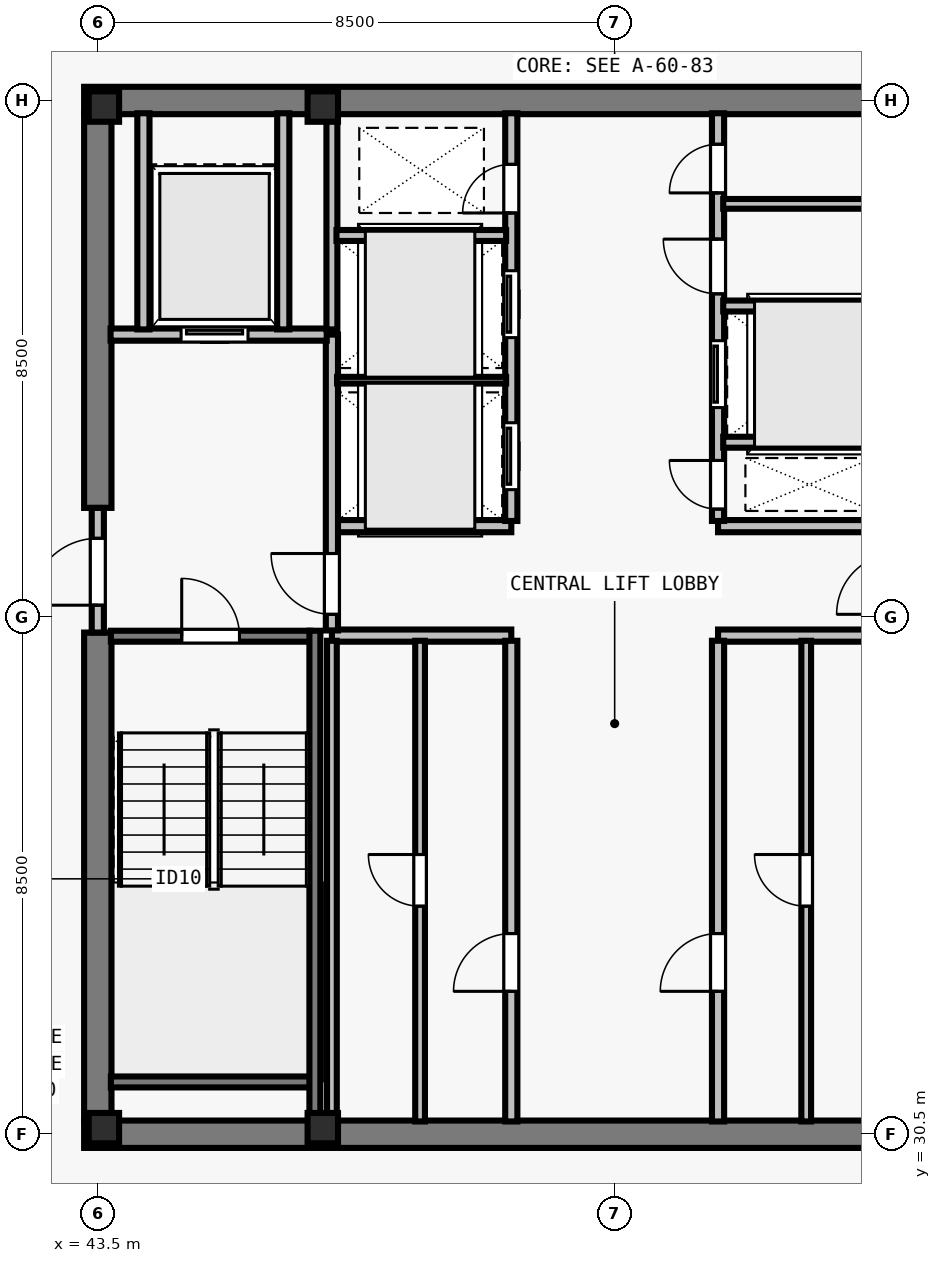
"""IFC4 building model, lengths in metres.
Left out: names, types, materials, properties, quantities, classifications, styles, units other than length and angle.
Written with IfcOpenShell. Run it as: python <this file> out.ifc"""

import sys

from ifc_helpers import new_model, si_unit, direction, frame, frame_2d, origin, origin_2d, place, context, subcontext, project, spatial, rectangle, i_section, extrude, element, fill, save


model = new_model("IFC4")
c1 = context("Model", 3, precision=1e-05, world=origin(), true_north=direction((0.0, 1.0)))
c2 = subcontext(c1, "Body", "Model", "MODEL_VIEW")
j1 = project(units=[si_unit("LENGTHUNIT", "METRE"), si_unit("PLANEANGLEUNIT", "RADIAN")], contexts=[c1])
p1 = place(None, origin())
s1 = spatial("IfcSite", under=j1, at=p1, CompositionType="ELEMENT")
p2 = place(p1, origin())
s2 = spatial("IfcBuilding", under=s1, at=p2, CompositionType="ELEMENT")
p3 = place(p2, frame((0.0, 0.0, 291.0)))
s3 = spatial("IfcBuildingStorey", under=s2, at=p3, CompositionType="ELEMENT", Elevation=291.0)
for number, where, z_axis, x_axis in (
    (1, (43.6, 30.6, 0.0), (0.0, 0.0, 1.0), (1.0, 0.0, 0.0)),
    (2, (47.2, 30.6, 0.0), (0.0, 0.0, 1.0), (1.0, 0.0, 0.0)),
    (3, (43.6, 47.4, 0.0), (0.0, 0.0, 1.0), (1.0, 0.0, 0.0)),
    (4, (47.2, 47.4, 0.0), (0.0, 0.0, 1.0), (1.0, 0.0, 0.0)),
):
    element("IfcColumn", number, at=place(p3, frame(where, z_axis=z_axis, x_axis=x_axis)), inside=s3, PredefinedType="COLUMN", context=c2, shape_type="SweptSolid", body=[
        extrude(i_section(OverallWidth=0.5, OverallDepth=0.5, WebThickness=0.028, FlangeThickness=0.045, at=origin_2d()), origin(), (0.0, 0.0, 1.0), 3.5),
    ])
for number, where, z_axis, x_axis in (
    (5, (43.275, 30.5, 0.0), (0.0, 0.0, 1.0), (1.0, 0.0, 0.0)),
    (6, (43.275, 47.5, 0.0), (0.0, 0.0, 1.0), (1.0, 0.0, 0.0)),
):
    element("IfcWall", number, at=place(p3, frame(where, z_axis=z_axis, x_axis=x_axis)), inside=s3, PredefinedType="SHEAR", context=c2, shape_type="SweptSolid", body=[
        extrude(rectangle(XDim=17.45, YDim=0.45, at=frame_2d((8.725, 0.0))), origin(), (0.0, 0.0, 1.0), 3.29),
    ])
p4 = place(p3, frame((43.5, 30.715, 0.0), z_axis=(0.0, 0.0, 1.0), x_axis=(0.0, 1.0, 0.0)))
e7 = element("IfcWall", 7, at=p4, inside=s3, PredefinedType="SHEAR", context=c2, shape_type="SweptSolid", body=[
    extrude(rectangle(XDim=8.035, YDim=0.45, at=frame_2d((4.018, 0.0))), origin(), (0.0, 0.0, 1.0), 3.29),
])
p5 = place(p3, frame((43.5, 40.8, 0.0), z_axis=(0.0, 0.0, 1.0), x_axis=(0.0, 1.0, 0.0)))
e8 = element("IfcWall", 8, at=p5, inside=s3, PredefinedType="SHEAR", context=c2, shape_type="SweptSolid", body=[
    extrude(rectangle(XDim=6.485, YDim=0.45, at=frame_2d((3.242, 0.0))), origin(), (0.0, 0.0, 1.0), 3.29),
])
for number, where, z_axis, x_axis in (
    (9, (47.35, 38.7, 0.0), (0.0, 0.0, 1.0), (1.0, 0.0, 0.0)),
    (10, (47.35, 40.5, 0.0), (0.0, 0.0, 1.0), (1.0, 0.0, 0.0)),
    (11, (53.7, 38.7, 0.0), (0.0, 0.0, 1.0), (1.0, 0.0, 0.0)),
    (12, (53.7, 40.5, 0.0), (0.0, 0.0, 1.0), (1.0, 0.0, 0.0)),
):
    element("IfcWall", number, at=place(p3, frame(where, z_axis=z_axis, x_axis=x_axis)), inside=s3, PredefinedType="SOLIDWALL", context=c2, shape_type="SweptSolid", body=[
        extrude(rectangle(XDim=2.95, YDim=0.2, at=frame_2d((1.475, 0.0))), origin(), (0.0, 0.0, 1.0), 3.29),
    ])
p6 = place(p3, frame((50.3, 30.71, 0.0), z_axis=(0.0, 0.0, 1.0), x_axis=(0.0, 1.0, 0.0)))
e13 = element("IfcWall", 13, at=p6, inside=s3, PredefinedType="SOLIDWALL", context=c2, shape_type="SweptSolid", body=[
    extrude(rectangle(XDim=7.905, YDim=0.2, at=frame_2d((3.953, 0.0))), origin(), (0.0, 0.0, 1.0), 3.29),
])
p7 = place(p6, frame((2.14, 0.0, 0.0)))
e14 = element("IfcOpeningElement", 14, at=p7, cuts=e13, PredefinedType="OPENING", context=c2, shape_type="SweptSolid", body=[
    extrude(rectangle(XDim=0.95, YDim=2.12, at=frame_2d((0.475, 1.06))), frame((0.0, 0.11, 0.0), z_axis=(0.0, -1.0, 0.0), x_axis=(1.0, 0.0, 0.0)), (0.0, 0.0, 1.0), 0.22),
])
p8 = place(p3, frame((53.7, 30.71, 0.0), z_axis=(0.0, 0.0, 1.0), x_axis=(0.0, 1.0, 0.0)))
e15 = element("IfcWall", 15, at=p8, inside=s3, PredefinedType="SOLIDWALL", context=c2, shape_type="SweptSolid", body=[
    extrude(rectangle(XDim=7.905, YDim=0.2, at=frame_2d((3.953, 0.0))), origin(), (0.0, 0.0, 1.0), 3.29),
])
p9 = place(p8, frame((2.14, 0.0, 0.0)))
e16 = element("IfcOpeningElement", 16, at=p9, cuts=e15, PredefinedType="OPENING", context=c2, shape_type="SweptSolid", body=[
    extrude(rectangle(XDim=0.95, YDim=2.12, at=frame_2d((0.475, 1.06))), frame((0.0, 0.11, 0.0), z_axis=(0.0, -1.0, 0.0), x_axis=(1.0, 0.0, 0.0)), (0.0, 0.0, 1.0), 0.22),
])
p10 = place(p3, frame((50.3, 40.585, 0.0), z_axis=(0.0, 0.0, 1.0), x_axis=(0.0, 1.0, 0.0)))
e17 = element("IfcWall", 17, at=p10, inside=s3, PredefinedType="SOLIDWALL", context=c2, shape_type="SweptSolid", body=[
    extrude(rectangle(XDim=6.705, YDim=0.2, at=frame_2d((3.353, 0.0))), origin(), (0.0, 0.0, 1.0), 3.29),
])
p11 = place(p10, frame((0.515, 0.0, 0.0)))
e18 = element("IfcOpeningElement", 18, at=p11, cuts=e17, PredefinedType="OPENING", context=c2, shape_type="SweptSolid", body=[
    extrude(rectangle(XDim=1.1, YDim=2.2, at=frame_2d((0.55, 1.1))), frame((0.0, 0.11, 0.0), z_axis=(0.0, -1.0, 0.0), x_axis=(1.0, 0.0, 0.0)), (0.0, 0.0, 1.0), 0.22),
])
p12 = place(p10, frame((3.015, 0.0, 0.0)))
e19 = element("IfcOpeningElement", 19, at=p12, cuts=e17, PredefinedType="OPENING", context=c2, shape_type="SweptSolid", body=[
    extrude(rectangle(XDim=1.1, YDim=2.2, at=frame_2d((0.55, 1.1))), frame((0.0, 0.11, 0.0), z_axis=(0.0, -1.0, 0.0), x_axis=(1.0, 0.0, 0.0)), (0.0, 0.0, 1.0), 0.22),
])
p13 = place(p10, frame((5.065, 0.0, 0.0)))
e20 = element("IfcOpeningElement", 20, at=p13, cuts=e17, PredefinedType="OPENING", context=c2, shape_type="SweptSolid", body=[
    extrude(rectangle(XDim=0.8, YDim=2.08, at=frame_2d((0.4, 1.04))), frame((0.0, 0.11, 0.0), z_axis=(0.0, -1.0, 0.0), x_axis=(1.0, 0.0, 0.0)), (0.0, 0.0, 1.0), 0.22),
])
p14 = place(p3, frame((53.7, 40.585, 0.0), z_axis=(0.0, 0.0, 1.0), x_axis=(0.0, 1.0, 0.0)))
e21 = element("IfcWall", 21, at=p14, inside=s3, PredefinedType="SOLIDWALL", context=c2, shape_type="SweptSolid", body=[
    extrude(rectangle(XDim=6.705, YDim=0.2, at=frame_2d((3.353, 0.0))), origin(), (0.0, 0.0, 1.0), 3.29),
])
p15 = place(p14, frame((0.195, 0.0, 0.0)))
e22 = element("IfcOpeningElement", 22, at=p15, cuts=e21, PredefinedType="OPENING", context=c2, shape_type="SweptSolid", body=[
    extrude(rectangle(XDim=0.8, YDim=2.08, at=frame_2d((0.4, 1.04))), frame((0.0, 0.11, 0.0), z_axis=(0.0, -1.0, 0.0), x_axis=(1.0, 0.0, 0.0)), (0.0, 0.0, 1.0), 0.22),
])
p16 = place(p14, frame((1.865, 0.0, 0.0)))
e23 = element("IfcOpeningElement", 23, at=p16, cuts=e21, PredefinedType="OPENING", context=c2, shape_type="SweptSolid", body=[
    extrude(rectangle(XDim=1.1, YDim=2.2, at=frame_2d((0.55, 1.1))), frame((0.0, 0.11, 0.0), z_axis=(0.0, -1.0, 0.0), x_axis=(1.0, 0.0, 0.0)), (0.0, 0.0, 1.0), 0.22),
])
p17 = place(p14, frame((3.735, 0.0, 0.0)))
e24 = element("IfcOpeningElement", 24, at=p17, cuts=e21, PredefinedType="OPENING", context=c2, shape_type="SweptSolid", body=[
    extrude(rectangle(XDim=0.9, YDim=2.12, at=frame_2d((0.45, 1.06))), frame((0.0, 0.11, 0.0), z_axis=(0.0, -1.0, 0.0), x_axis=(1.0, 0.0, 0.0)), (0.0, 0.0, 1.0), 0.22),
])
p18 = place(p14, frame((5.395, 0.0, 0.0)))
e25 = element("IfcOpeningElement", 25, at=p18, cuts=e21, PredefinedType="OPENING", context=c2, shape_type="SweptSolid", body=[
    extrude(rectangle(XDim=0.8, YDim=2.1, at=frame_2d((0.4, 1.05))), frame((0.0, 0.11, 0.0), z_axis=(0.0, -1.0, 0.0), x_axis=(1.0, 0.0, 0.0)), (0.0, 0.0, 1.0), 0.22),
])
p19 = place(p3, frame((43.5, 38.75, 0.0), z_axis=(0.0, 0.0, 1.0), x_axis=(0.0, 1.0, 0.0)))
e26 = element("IfcWall", 26, at=p19, inside=s3, PredefinedType="SOLIDWALL", context=c2, shape_type="SweptSolid", body=[
    extrude(rectangle(XDim=2.05, YDim=0.2, at=frame_2d((1.025, 0.0))), origin(), (0.0, 0.0, 1.0), 3.29),
])
p20 = place(p19, frame((0.45, 0.0, 0.0)))
e27 = element("IfcOpeningElement", 27, at=p20, cuts=e26, PredefinedType="OPENING", context=c2, shape_type="SweptSolid", body=[
    extrude(rectangle(XDim=1.1, YDim=2.15, at=frame_2d((0.55, 1.075))), frame((0.0, 0.11, 0.0), z_axis=(0.0, -1.0, 0.0), x_axis=(1.0, 0.0, 0.0)), (0.0, 0.0, 1.0), 0.22),
])
p21 = place(p3, frame((47.35, 38.785, 0.0), z_axis=(0.0, 0.0, 1.0), x_axis=(0.0, 1.0, 0.0)))
e28 = element("IfcWall", 28, at=p21, inside=s3, PredefinedType="SOLIDWALL", context=c2, shape_type="SweptSolid", body=[
    extrude(rectangle(XDim=4.865, YDim=0.2, at=frame_2d((2.433, 0.0))), origin(), (0.0, 0.0, 1.0), 3.29),
])
p22 = place(p21, frame((0.265, 0.0, 0.0)))
e29 = element("IfcOpeningElement", 29, at=p22, cuts=e28, PredefinedType="OPENING", context=c2, shape_type="SweptSolid", body=[
    extrude(rectangle(XDim=1.0, YDim=2.15, at=frame_2d((0.5, 1.075))), frame((0.0, 0.11, 0.0), z_axis=(0.0, -1.0, 0.0), x_axis=(1.0, 0.0, 0.0)), (0.0, 0.0, 1.0), 0.22),
])
p23 = place(p3, frame((43.71, 43.65, 0.0), z_axis=(0.0, 0.0, 1.0), x_axis=(1.0, 0.0, 0.0)))
e30 = element("IfcWall", 30, at=p23, inside=s3, PredefinedType="SOLIDWALL", context=c2, shape_type="SweptSolid", body=[
    extrude(rectangle(XDim=3.555, YDim=0.2, at=frame_2d((1.777, 0.0))), origin(), (0.0, 0.0, 1.0), 3.29),
])
p24 = place(p23, frame((1.16, 0.0, 0.0)))
e31 = element("IfcOpeningElement", 31, at=p24, cuts=e30, PredefinedType="OPENING", context=c2, shape_type="SweptSolid", body=[
    extrude(rectangle(XDim=1.1, YDim=2.2, at=frame_2d((0.55, 1.1))), frame((0.0, 0.11, 0.0), z_axis=(0.0, -1.0, 0.0), x_axis=(1.0, 0.0, 0.0)), (0.0, 0.0, 1.0), 0.22),
])
for number, where, z_axis, x_axis in (
    (32, (46.55, 43.735, 0.0), (0.0, 0.0, 1.0), (0.0, 1.0, 0.0)),
    (33, (44.25, 43.735, 0.0), (0.0, 0.0, 1.0), (0.0, 1.0, 0.0)),
):
    element("IfcWall", number, at=place(p3, frame(where, z_axis=z_axis, x_axis=x_axis)), inside=s3, PredefinedType="SOLIDWALL", context=c2, shape_type="SweptSolid", body=[
        extrude(rectangle(XDim=3.555, YDim=0.2, at=frame_2d((1.777, 0.0))), origin(), (0.0, 0.0, 1.0), 3.29),
    ])
p25 = place(p3, frame((47.35, 30.71, 0.0), z_axis=(0.0, 0.0, 1.0), x_axis=(0.0, 1.0, 0.0)))
e34 = element("IfcWall", 34, at=p25, inside=s3, PredefinedType="PARTITIONING", context=c2, shape_type="SweptSolid", body=[
    extrude(rectangle(XDim=7.905, YDim=0.16, at=frame_2d((3.953, 0.0))), origin(), (0.0, 0.0, 1.0), 3.29),
])
p26 = place(p3, frame((48.8, 30.71, 0.0), z_axis=(0.0, 0.0, 1.0), x_axis=(0.0, 1.0, 0.0)))
e35 = element("IfcWall", 35, at=p26, inside=s3, PredefinedType="PARTITIONING", context=c2, shape_type="SweptSolid", body=[
    extrude(rectangle(XDim=7.905, YDim=0.16, at=frame_2d((3.953, 0.0))), origin(), (0.0, 0.0, 1.0), 3.29),
])
p27 = place(p26, frame((3.54, 0.0, 0.0)))
e36 = element("IfcOpeningElement", 36, at=p27, cuts=e35, PredefinedType="OPENING", context=c2, shape_type="SweptSolid", body=[
    extrude(rectangle(XDim=0.85, YDim=2.12, at=frame_2d((0.425, 1.06))), frame((0.0, 0.09, 0.0), z_axis=(0.0, -1.0, 0.0), x_axis=(1.0, 0.0, 0.0)), (0.0, 0.0, 1.0), 0.18),
])
p28 = place(p3, frame((55.15, 30.71, 0.0), z_axis=(0.0, 0.0, 1.0), x_axis=(0.0, 1.0, 0.0)))
e37 = element("IfcWall", 37, at=p28, inside=s3, PredefinedType="PARTITIONING", context=c2, shape_type="SweptSolid", body=[
    extrude(rectangle(XDim=7.905, YDim=0.16, at=frame_2d((3.953, 0.0))), origin(), (0.0, 0.0, 1.0), 3.29),
])
p29 = place(p28, frame((3.54, 0.0, 0.0)))
e38 = element("IfcOpeningElement", 38, at=p29, cuts=e37, PredefinedType="OPENING", context=c2, shape_type="SweptSolid", body=[
    extrude(rectangle(XDim=0.85, YDim=2.12, at=frame_2d((0.425, 1.06))), frame((0.0, 0.09, 0.0), z_axis=(0.0, -1.0, 0.0), x_axis=(1.0, 0.0, 0.0)), (0.0, 0.0, 1.0), 0.18),
])
p30 = place(p3, frame((47.35, 43.735, 0.0), z_axis=(0.0, 0.0, 1.0), x_axis=(0.0, 1.0, 0.0)))
e39 = element("IfcWall", 39, at=p30, inside=s3, PredefinedType="SOLIDWALL", context=c2, shape_type="SweptSolid", body=[
    extrude(rectangle(XDim=3.555, YDim=0.18, at=frame_2d((1.777, 0.0))), origin(), (0.0, 0.0, 1.0), 3.29),
])
p31 = place(p3, frame((47.435, 42.9, 0.0), z_axis=(0.0, 0.0, 1.0), x_axis=(1.0, 0.0, 0.0)))
e40 = element("IfcWall", 40, at=p31, inside=s3, PredefinedType="PARTITIONING", context=c2, shape_type="SweptSolid", body=[
    extrude(rectangle(XDim=2.78, YDim=0.11, at=frame_2d((1.39, 0.0))), origin(), (0.0, 0.0, 1.0), 3.29),
])
p32 = place(p3, frame((47.425, 45.28, 0.0), z_axis=(0.0, 0.0, 1.0), x_axis=(1.0, 0.0, 0.0)))
e41 = element("IfcWall", 41, at=p32, inside=s3, PredefinedType="SOLIDWALL", context=c2, shape_type="SweptSolid", body=[
    extrude(rectangle(XDim=2.79, YDim=0.18, at=frame_2d((1.395, 0.0))), origin(), (0.0, 0.0, 1.0), 3.29),
])
p33 = place(p3, frame((53.785, 41.88, 0.0), z_axis=(0.0, 0.0, 1.0), x_axis=(1.0, 0.0, 0.0)))
e42 = element("IfcWall", 42, at=p33, inside=s3, PredefinedType="SOLIDWALL", context=c2, shape_type="SweptSolid", body=[
    extrude(rectangle(XDim=2.78, YDim=0.18, at=frame_2d((1.39, 0.0))), origin(), (0.0, 0.0, 1.0), 3.29),
])
p34 = place(p3, frame((53.785, 44.12, 0.0), z_axis=(0.0, 0.0, 1.0), x_axis=(1.0, 0.0, 0.0)))
e43 = element("IfcWall", 43, at=p34, inside=s3, PredefinedType="SOLIDWALL", context=c2, shape_type="SweptSolid", body=[
    extrude(rectangle(XDim=2.79, YDim=0.18, at=frame_2d((1.395, 0.0))), origin(), (0.0, 0.0, 1.0), 3.29),
])
p35 = place(p3, frame((53.785, 45.8, 0.0), z_axis=(0.0, 0.0, 1.0), x_axis=(1.0, 0.0, 0.0)))
e44 = element("IfcWall", 44, at=p35, inside=s3, PredefinedType="PARTITIONING", context=c2, shape_type="SweptSolid", body=[
    extrude(rectangle(XDim=2.79, YDim=0.16, at=frame_2d((1.395, 0.0))), origin(), (0.0, 0.0, 1.0), 3.29),
])
p36 = place(p3, frame((43.715, 38.69, 0.0), z_axis=(0.0, 0.0, 1.0), x_axis=(1.0, 0.0, 0.0)))
e45 = element("IfcWall", 45, at=p36, inside=s3, PredefinedType="SOLIDWALL", context=c2, shape_type="SweptSolid", body=[
    extrude(rectangle(XDim=3.28, YDim=0.18, at=frame_2d((1.64, 0.0))), origin(), (0.0, 0.0, 1.0), 3.29),
])
p37 = place(p36, frame((1.165, 0.0, 0.0)))
e46 = element("IfcOpeningElement", 46, at=p37, cuts=e45, PredefinedType="OPENING", context=c2, shape_type="SweptSolid", body=[
    extrude(rectangle(XDim=0.95, YDim=2.15, at=frame_2d((0.475, 1.075))), frame((0.0, 0.1, 0.0), z_axis=(0.0, -1.0, 0.0), x_axis=(1.0, 0.0, 0.0)), (0.0, 0.0, 1.0), 0.2),
])
p38 = place(p3, frame((43.715, 31.36, 0.0), z_axis=(0.0, 0.0, 1.0), x_axis=(1.0, 0.0, 0.0)))
e47 = element("IfcWall", 47, at=p38, inside=s3, PredefinedType="SOLIDWALL", context=c2, shape_type="SweptSolid", body=[
    extrude(rectangle(XDim=3.28, YDim=0.18, at=frame_2d((1.64, 0.0))), origin(), (0.0, 0.0, 1.0), 3.29),
])
p39 = place(p3, frame((47.07, 38.78, 0.0), z_axis=(0.0, 0.0, 1.0), x_axis=(0.0, -1.0, 0.0)))
e48 = element("IfcWall", 48, at=p39, inside=s3, PredefinedType="SOLIDWALL", context=c2, shape_type="SweptSolid", body=[
    extrude(rectangle(XDim=8.067, YDim=0.18, at=frame_2d((4.034, 0.0))), origin(), (0.0, 0.0, 1.0), 3.29),
])
p40 = place(p20, origin())
e49 = element("IfcDoor", 49, at=p40, inside=s3, OperationType="SINGLE_SWING_LEFT", PredefinedType="DOOR", context=c2, shape_type="SweptSolid", body=[
    extrude(rectangle(XDim=1.1, YDim=2.15, at=frame_2d((0.55, 1.075))), frame((0.0, 0.025, 0.0), z_axis=(0.0, -1.0, 0.0), x_axis=(1.0, 0.0, 0.0)), (0.0, 0.0, 1.0), 0.05),
])
fill(e27, e49)
p41 = place(p22, origin())
e50 = element("IfcDoor", 50, at=p41, inside=s3, OperationType="SINGLE_SWING_RIGHT", PredefinedType="DOOR", context=c2, shape_type="SweptSolid", body=[
    extrude(rectangle(XDim=1.0, YDim=2.15, at=frame_2d((0.5, 1.075))), frame((0.0, 0.025, 0.0), z_axis=(0.0, -1.0, 0.0), x_axis=(1.0, 0.0, 0.0)), (0.0, 0.0, 1.0), 0.05),
])
fill(e29, e50)
p42 = place(p24, origin())
e51 = element("IfcDoor", 51, at=p42, inside=s3, OperationType="SLIDING_TO_LEFT", PredefinedType="DOOR", context=c2, shape_type="SweptSolid", body=[
    extrude(rectangle(XDim=1.1, YDim=2.2, at=frame_2d((0.55, 1.1))), frame((0.0, 0.025, 0.0), z_axis=(0.0, -1.0, 0.0), x_axis=(1.0, 0.0, 0.0)), (0.0, 0.0, 1.0), 0.05),
])
fill(e31, e51)
p43 = place(p7, origin())
e52 = element("IfcDoor", 52, at=p43, inside=s3, OperationType="SINGLE_SWING_LEFT", PredefinedType="DOOR", context=c2, shape_type="SweptSolid", body=[
    extrude(rectangle(XDim=0.95, YDim=2.12, at=frame_2d((0.475, 1.06))), frame((0.0, 0.025, 0.0), z_axis=(0.0, -1.0, 0.0), x_axis=(1.0, 0.0, 0.0)), (0.0, 0.0, 1.0), 0.05),
])
fill(e14, e52)
p44 = place(p27, origin())
e53 = element("IfcDoor", 53, at=p44, inside=s3, OperationType="SINGLE_SWING_RIGHT", PredefinedType="DOOR", context=c2, shape_type="SweptSolid", body=[
    extrude(rectangle(XDim=0.85, YDim=2.12, at=frame_2d((0.425, 1.06))), frame((0.0, 0.025, 0.0), z_axis=(0.0, -1.0, 0.0), x_axis=(1.0, 0.0, 0.0)), (0.0, 0.0, 1.0), 0.05),
])
fill(e36, e53)
p45 = place(p9, origin())
e54 = element("IfcDoor", 54, at=p45, inside=s3, OperationType="SINGLE_SWING_LEFT", PredefinedType="DOOR", context=c2, shape_type="SweptSolid", body=[
    extrude(rectangle(XDim=0.95, YDim=2.12, at=frame_2d((0.475, 1.06))), frame((0.0, 0.025, 0.0), z_axis=(0.0, -1.0, 0.0), x_axis=(1.0, 0.0, 0.0)), (0.0, 0.0, 1.0), 0.05),
])
fill(e16, e54)
p46 = place(p29, origin())
e55 = element("IfcDoor", 55, at=p46, inside=s3, OperationType="SINGLE_SWING_RIGHT", PredefinedType="DOOR", context=c2, shape_type="SweptSolid", body=[
    extrude(rectangle(XDim=0.85, YDim=2.12, at=frame_2d((0.425, 1.06))), frame((0.0, 0.025, 0.0), z_axis=(0.0, -1.0, 0.0), x_axis=(1.0, 0.0, 0.0)), (0.0, 0.0, 1.0), 0.05),
])
fill(e38, e55)
p47 = place(p11, origin())
e56 = element("IfcDoor", 56, at=p47, inside=s3, OperationType="SLIDING_TO_LEFT", PredefinedType="DOOR", context=c2, shape_type="SweptSolid", body=[
    extrude(rectangle(XDim=1.1, YDim=2.2, at=frame_2d((0.55, 1.1))), frame((0.0, 0.025, 0.0), z_axis=(0.0, -1.0, 0.0), x_axis=(1.0, 0.0, 0.0)), (0.0, 0.0, 1.0), 0.05),
])
fill(e18, e56)
p48 = place(p12, origin())
e57 = element("IfcDoor", 57, at=p48, inside=s3, OperationType="SLIDING_TO_LEFT", PredefinedType="DOOR", context=c2, shape_type="SweptSolid", body=[
    extrude(rectangle(XDim=1.1, YDim=2.2, at=frame_2d((0.55, 1.1))), frame((0.0, 0.025, 0.0), z_axis=(0.0, -1.0, 0.0), x_axis=(1.0, 0.0, 0.0)), (0.0, 0.0, 1.0), 0.05),
])
fill(e19, e57)
p49 = place(p13, origin())
e58 = element("IfcDoor", 58, at=p49, inside=s3, OperationType="SINGLE_SWING_LEFT", PredefinedType="DOOR", context=c2, shape_type="SweptSolid", body=[
    extrude(rectangle(XDim=0.8, YDim=2.08, at=frame_2d((0.4, 1.04))), frame((0.0, 0.025, 0.0), z_axis=(0.0, -1.0, 0.0), x_axis=(1.0, 0.0, 0.0)), (0.0, 0.0, 1.0), 0.05),
])
fill(e20, e58)
p50 = place(p15, origin())
e59 = element("IfcDoor", 59, at=p50, inside=s3, OperationType="SINGLE_SWING_RIGHT", PredefinedType="DOOR", context=c2, shape_type="SweptSolid", body=[
    extrude(rectangle(XDim=0.8, YDim=2.08, at=frame_2d((0.4, 1.04))), frame((0.0, 0.025, 0.0), z_axis=(0.0, -1.0, 0.0), x_axis=(1.0, 0.0, 0.0)), (0.0, 0.0, 1.0), 0.05),
])
fill(e22, e59)
p51 = place(p16, origin())
e60 = element("IfcDoor", 60, at=p51, inside=s3, OperationType="SLIDING_TO_LEFT", PredefinedType="DOOR", context=c2, shape_type="SweptSolid", body=[
    extrude(rectangle(XDim=1.1, YDim=2.2, at=frame_2d((0.55, 1.1))), frame((0.0, 0.025, 0.0), z_axis=(0.0, -1.0, 0.0), x_axis=(1.0, 0.0, 0.0)), (0.0, 0.0, 1.0), 0.05),
])
fill(e23, e60)
p52 = place(p17, origin())
e61 = element("IfcDoor", 61, at=p52, inside=s3, OperationType="SINGLE_SWING_RIGHT", PredefinedType="DOOR", context=c2, shape_type="SweptSolid", body=[
    extrude(rectangle(XDim=0.9, YDim=2.12, at=frame_2d((0.45, 1.06))), frame((0.0, 0.025, 0.0), z_axis=(0.0, -1.0, 0.0), x_axis=(1.0, 0.0, 0.0)), (0.0, 0.0, 1.0), 0.05),
])
fill(e24, e61)
p53 = place(p18, origin())
e62 = element("IfcDoor", 62, at=p53, inside=s3, OperationType="SINGLE_SWING_LEFT", PredefinedType="DOOR", context=c2, shape_type="SweptSolid", body=[
    extrude(rectangle(XDim=0.8, YDim=2.1, at=frame_2d((0.4, 1.05))), frame((0.0, 0.025, 0.0), z_axis=(0.0, -1.0, 0.0), x_axis=(1.0, 0.0, 0.0)), (0.0, 0.0, 1.0), 0.05),
])
fill(e25, e62)
p54 = place(p37, origin())
e63 = element("IfcDoor", 63, at=p54, inside=s3, OperationType="SINGLE_SWING_LEFT", PredefinedType="DOOR", context=c2, shape_type="SweptSolid", body=[
    extrude(rectangle(XDim=0.95, YDim=2.15, at=frame_2d((0.475, 1.075))), frame((0.0, 0.025, 0.0), z_axis=(0.0, -1.0, 0.0), x_axis=(1.0, 0.0, 0.0)), (0.0, 0.0, 1.0), 0.05),
])
fill(e46, e63)
save(model, sys.argv[1])
